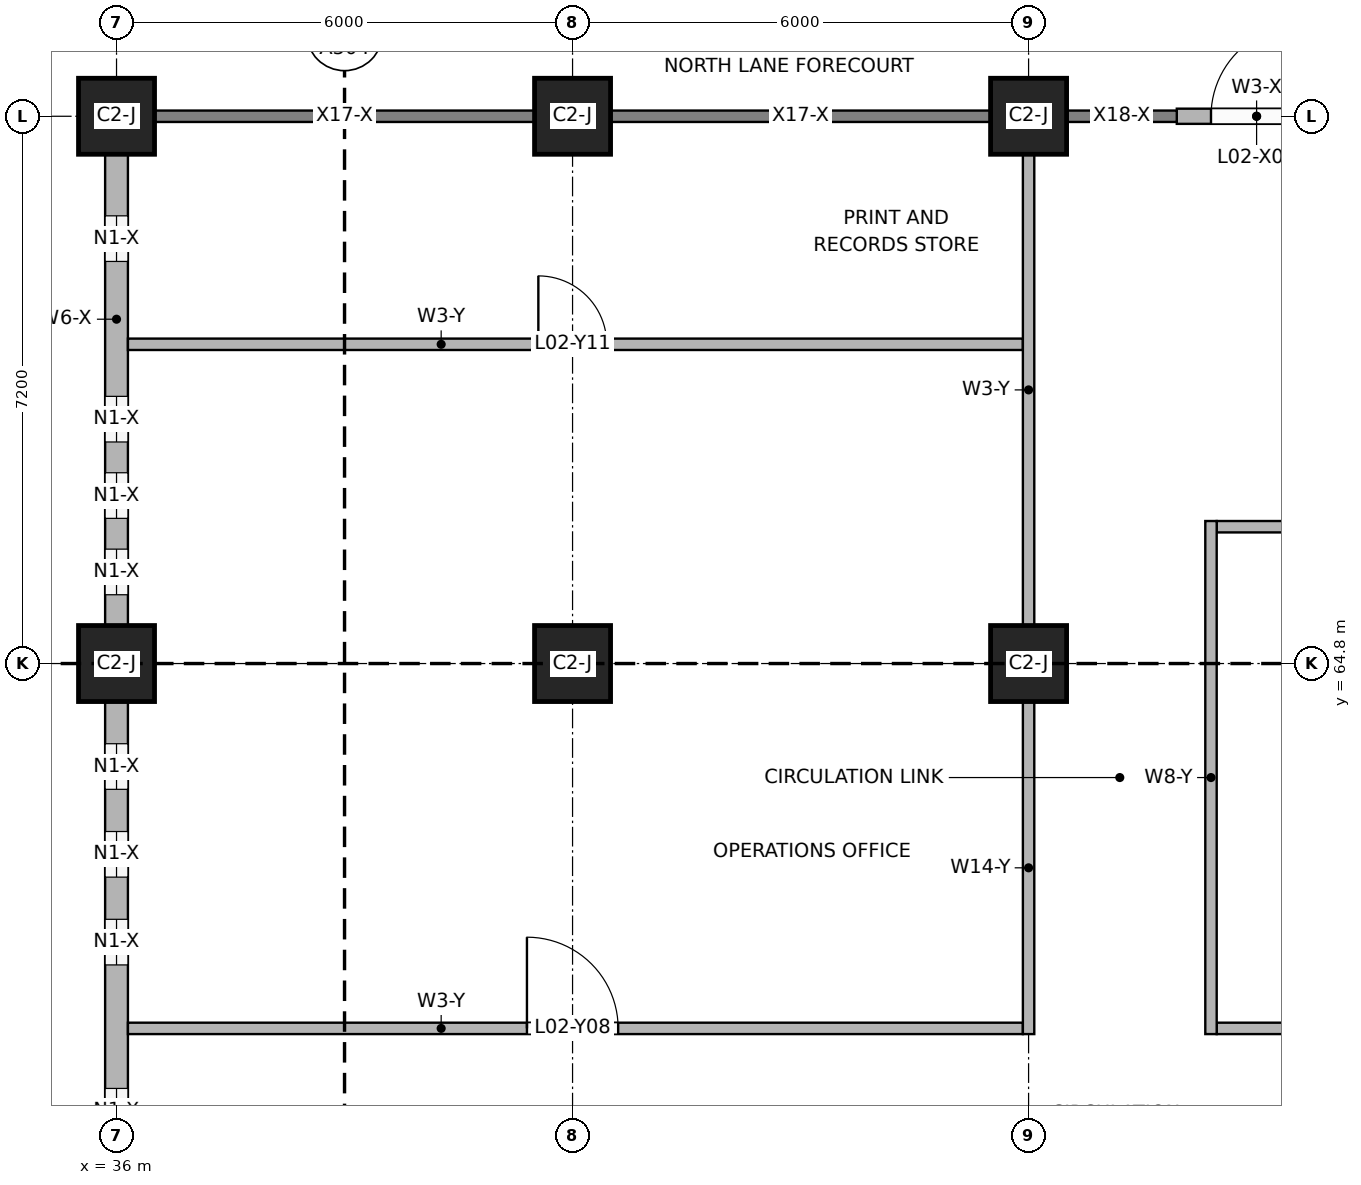
"""IFC4 building model, lengths in metres.
Left out: names, types, materials, properties, quantities, classifications, styles, units other than length and angle.
Written with IfcOpenShell. Run it as: python <this file> out.ifc"""

import sys

from ifc_helpers import new_model, si_unit, direction, frame, frame_2d, origin, origin_2d, place, context, subcontext, project, spatial, rectangle, extrude, element, fill, save


model = new_model("IFC4")
c1 = context("Model", 3, precision=1e-05, world=origin(), true_north=direction((0.0, 1.0)))
c2 = subcontext(c1, "Body", "Model", "MODEL_VIEW")
j1 = project(units=[si_unit("LENGTHUNIT", "METRE"), si_unit("PLANEANGLEUNIT", "RADIAN")], contexts=[c1])
p1 = place(None, origin())
s1 = spatial("IfcSite", under=j1, at=p1, CompositionType="ELEMENT")
p2 = place(p1, origin())
s2 = spatial("IfcBuilding", under=s1, at=p2, CompositionType="ELEMENT")
p3 = place(p2, frame((0.0, 0.0, 8.4)))
s3 = spatial("IfcBuildingStorey", under=s2, at=p3, CompositionType="ELEMENT", Elevation=8.4)
for number, where, z_axis, x_axis in (
    (1, (36.0, 64.8, 0.0), (0.0, 0.0, 1.0), (1.0, 0.0, 0.0)),
    (2, (42.0, 64.8, 0.0), (0.0, 0.0, 1.0), (1.0, 0.0, 0.0)),
    (3, (48.0, 64.8, 0.0), (0.0, 0.0, 1.0), (1.0, 0.0, 0.0)),
    (4, (36.0, 72.0, 0.0), (0.0, 0.0, 1.0), (1.0, 0.0, 0.0)),
    (5, (42.0, 72.0, 0.0), (0.0, 0.0, 1.0), (1.0, 0.0, 0.0)),
    (6, (48.0, 72.0, 0.0), (0.0, 0.0, 1.0), (1.0, 0.0, 0.0)),
):
    element("IfcColumn", number, at=place(p3, frame(where, z_axis=z_axis, x_axis=x_axis)), inside=s3, PredefinedType="COLUMN", context=c2, shape_type="SweptSolid", body=[
        extrude(rectangle(XDim=1.0, YDim=1.0, at=origin_2d()), origin(), (0.0, 0.0, 1.0), 4.0),
    ])
p4 = place(p3, frame((49.95, 72.0, 0.0), z_axis=(0.0, 0.0, 1.0), x_axis=(1.0, 0.0, 0.0)))
e7 = element("IfcWall", 7, at=p4, inside=s3, PredefinedType="SOLIDWALL", context=c2, shape_type="SweptSolid", body=[
    extrude(rectangle(XDim=2.1, YDim=0.2, at=frame_2d((1.05, 0.0))), origin(), (0.0, 0.0, 1.0), 3.2),
])
p5 = place(p4, frame((0.45, 0.0, 0.0)))
e8 = element("IfcOpeningElement", 8, at=p5, cuts=e7, PredefinedType="OPENING", context=c2, shape_type="SweptSolid", body=[
    extrude(rectangle(XDim=1.2, YDim=2.4, at=frame_2d((0.6, 1.2))), frame((0.0, 0.11, 0.0), z_axis=(0.0, -1.0, 0.0), x_axis=(1.0, 0.0, 0.0)), (0.0, 0.0, 1.0), 0.22),
])
p6 = place(p3, frame((36.0, 58.1, 0.0), z_axis=(0.0, 0.0, 1.0), x_axis=(0.0, 1.0, 0.0)))
e9 = element("IfcWall", 9, at=p6, inside=s3, PredefinedType="SOLIDWALL", context=c2, shape_type="SweptSolid", body=[
    extrude(rectangle(XDim=6.2, YDim=0.3, at=frame_2d((3.1, 0.0))), origin(), (0.0, 0.0, 1.0), 3.1),
])
p7 = place(p6, frame((0.51, 0.0, 0.9)))
e10 = element("IfcOpeningElement", 10, at=p7, cuts=e9, PredefinedType="OPENING", context=c2, shape_type="SweptSolid", body=[
    extrude(rectangle(XDim=0.6, YDim=1.9, at=frame_2d((0.3, 0.95))), frame((0.0, 0.16, 0.0), z_axis=(0.0, -1.0, 0.0), x_axis=(1.0, 0.0, 0.0)), (0.0, 0.0, 1.0), 0.32),
])
p8 = place(p6, frame((2.735, 0.0, 0.9)))
e11 = element("IfcOpeningElement", 11, at=p8, cuts=e9, PredefinedType="OPENING", context=c2, shape_type="SweptSolid", body=[
    extrude(rectangle(XDim=0.6, YDim=1.9, at=frame_2d((0.3, 0.95))), frame((0.0, 0.16, 0.0), z_axis=(0.0, -1.0, 0.0), x_axis=(1.0, 0.0, 0.0)), (0.0, 0.0, 1.0), 0.32),
])
p9 = place(p6, frame((3.89, 0.0, 0.9)))
e12 = element("IfcOpeningElement", 12, at=p9, cuts=e9, PredefinedType="OPENING", context=c2, shape_type="SweptSolid", body=[
    extrude(rectangle(XDim=0.6, YDim=1.9, at=frame_2d((0.3, 0.95))), frame((0.0, 0.16, 0.0), z_axis=(0.0, -1.0, 0.0), x_axis=(1.0, 0.0, 0.0)), (0.0, 0.0, 1.0), 0.32),
])
p10 = place(p6, frame((5.045, 0.0, 0.9)))
e13 = element("IfcOpeningElement", 13, at=p10, cuts=e9, PredefinedType="OPENING", context=c2, shape_type="SweptSolid", body=[
    extrude(rectangle(XDim=0.6, YDim=1.9, at=frame_2d((0.3, 0.95))), frame((0.0, 0.16, 0.0), z_axis=(0.0, -1.0, 0.0), x_axis=(1.0, 0.0, 0.0)), (0.0, 0.0, 1.0), 0.32),
])
p11 = place(p3, frame((36.0, 65.3, 0.0), z_axis=(0.0, 0.0, 1.0), x_axis=(0.0, 1.0, 0.0)))
e14 = element("IfcWall", 14, at=p11, inside=s3, PredefinedType="SOLIDWALL", context=c2, shape_type="SweptSolid", body=[
    extrude(rectangle(XDim=6.2, YDim=0.3, at=frame_2d((3.1, 0.0))), origin(), (0.0, 0.0, 1.0), 3.1),
])
p12 = place(p11, frame((0.405, 0.0, 0.9)))
e15 = element("IfcOpeningElement", 15, at=p12, cuts=e14, PredefinedType="OPENING", context=c2, shape_type="SweptSolid", body=[
    extrude(rectangle(XDim=0.6, YDim=1.9, at=frame_2d((0.3, 0.95))), frame((0.0, 0.16, 0.0), z_axis=(0.0, -1.0, 0.0), x_axis=(1.0, 0.0, 0.0)), (0.0, 0.0, 1.0), 0.32),
])
p13 = place(p11, frame((1.41, 0.0, 0.9)))
e16 = element("IfcOpeningElement", 16, at=p13, cuts=e14, PredefinedType="OPENING", context=c2, shape_type="SweptSolid", body=[
    extrude(rectangle(XDim=0.6, YDim=1.9, at=frame_2d((0.3, 0.95))), frame((0.0, 0.16, 0.0), z_axis=(0.0, -1.0, 0.0), x_axis=(1.0, 0.0, 0.0)), (0.0, 0.0, 1.0), 0.32),
])
p14 = place(p11, frame((2.415, 0.0, 0.9)))
e17 = element("IfcOpeningElement", 17, at=p14, cuts=e14, PredefinedType="OPENING", context=c2, shape_type="SweptSolid", body=[
    extrude(rectangle(XDim=0.6, YDim=1.9, at=frame_2d((0.3, 0.95))), frame((0.0, 0.16, 0.0), z_axis=(0.0, -1.0, 0.0), x_axis=(1.0, 0.0, 0.0)), (0.0, 0.0, 1.0), 0.32),
])
p15 = place(p11, frame((4.79, 0.0, 0.9)))
e18 = element("IfcOpeningElement", 18, at=p15, cuts=e14, PredefinedType="OPENING", context=c2, shape_type="SweptSolid", body=[
    extrude(rectangle(XDim=0.6, YDim=1.9, at=frame_2d((0.3, 0.95))), frame((0.0, 0.16, 0.0), z_axis=(0.0, -1.0, 0.0), x_axis=(1.0, 0.0, 0.0)), (0.0, 0.0, 1.0), 0.32),
])
p16 = place(p3, frame((48.0, 59.925, 0.0), z_axis=(0.0, 0.0, 1.0), x_axis=(0.0, 1.0, 0.0)))
e19 = element("IfcWall", 19, at=p16, inside=s3, PredefinedType="PARTITIONING", context=c2, shape_type="SweptSolid", body=[
    extrude(rectangle(XDim=4.375, YDim=0.15, at=frame_2d((2.188, 0.0))), origin(), (0.0, 0.0, 1.0), 4.0),
])
p17 = place(p3, frame((48.0, 65.3, 0.0), z_axis=(0.0, 0.0, 1.0), x_axis=(0.0, 1.0, 0.0)))
e20 = element("IfcWall", 20, at=p17, inside=s3, PredefinedType="PARTITIONING", context=c2, shape_type="SweptSolid", body=[
    extrude(rectangle(XDim=6.2, YDim=0.15, at=frame_2d((3.1, 0.0))), origin(), (0.0, 0.0, 1.0), 3.1),
])
p18 = place(p3, frame((50.4, 59.925, 0.0), z_axis=(0.0, 0.0, 1.0), x_axis=(0.0, 1.0, 0.0)))
e21 = element("IfcWall", 21, at=p18, inside=s3, PredefinedType="PARTITIONING", context=c2, shape_type="SweptSolid", body=[
    extrude(rectangle(XDim=6.75, YDim=0.15, at=frame_2d((3.375, 0.0))), origin(), (0.0, 0.0, 1.0), 3.2),
])
p19 = place(p3, frame((36.15, 60.0, 0.0), z_axis=(0.0, 0.0, 1.0), x_axis=(1.0, 0.0, 0.0)))
e22 = element("IfcWall", 22, at=p19, inside=s3, PredefinedType="PARTITIONING", context=c2, shape_type="SweptSolid", body=[
    extrude(rectangle(XDim=11.775, YDim=0.15, at=frame_2d((5.888, 0.0))), origin(), (0.0, 0.0, 1.0), 3.1),
])
p20 = place(p19, frame((5.25, 0.0, 0.0)))
e23 = element("IfcOpeningElement", 23, at=p20, cuts=e22, PredefinedType="OPENING", context=c2, shape_type="SweptSolid", body=[
    extrude(rectangle(XDim=1.2, YDim=2.1, at=frame_2d((0.6, 1.05))), frame((0.0, 0.085, 0.0), z_axis=(0.0, -1.0, 0.0), x_axis=(1.0, 0.0, 0.0)), (0.0, 0.0, 1.0), 0.17),
])
p21 = place(p3, frame((50.475, 60.0, 0.0), z_axis=(0.0, 0.0, 1.0), x_axis=(1.0, 0.0, 0.0)))
e24 = element("IfcWall", 24, at=p21, inside=s3, PredefinedType="PARTITIONING", context=c2, shape_type="SweptSolid", body=[
    extrude(rectangle(XDim=15.45, YDim=0.15, at=frame_2d((7.725, 0.0))), origin(), (0.0, 0.0, 1.0), 3.1),
])
p22 = place(p21, frame((7.125, 0.0, 0.0)))
e25 = element("IfcOpeningElement", 25, at=p22, cuts=e24, PredefinedType="OPENING", context=c2, shape_type="SweptSolid", body=[
    extrude(rectangle(XDim=1.2, YDim=2.1, at=frame_2d((0.6, 1.05))), frame((0.0, 0.085, 0.0), z_axis=(0.0, -1.0, 0.0), x_axis=(1.0, 0.0, 0.0)), (0.0, 0.0, 1.0), 0.17),
])
p23 = place(p3, frame((50.475, 66.6, 0.0), z_axis=(0.0, 0.0, 1.0), x_axis=(1.0, 0.0, 0.0)))
e26 = element("IfcWall", 26, at=p23, inside=s3, PredefinedType="PARTITIONING", context=c2, shape_type="SweptSolid", body=[
    extrude(rectangle(XDim=15.525, YDim=0.15, at=frame_2d((7.762, 0.0))), origin(), (0.0, 0.0, 1.0), 3.1),
])
p24 = place(p3, frame((36.15, 69.0, 0.0), z_axis=(0.0, 0.0, 1.0), x_axis=(1.0, 0.0, 0.0)))
e27 = element("IfcWall", 27, at=p24, inside=s3, PredefinedType="PARTITIONING", context=c2, shape_type="SweptSolid", body=[
    extrude(rectangle(XDim=11.775, YDim=0.15, at=frame_2d((5.888, 0.0))), origin(), (0.0, 0.0, 1.0), 3.1),
])
p25 = place(p24, frame((5.4, 0.0, 0.0)))
e28 = element("IfcOpeningElement", 28, at=p25, cuts=e27, PredefinedType="OPENING", context=c2, shape_type="SweptSolid", body=[
    extrude(rectangle(XDim=0.9, YDim=2.1, at=frame_2d((0.45, 1.05))), frame((0.0, 0.085, 0.0), z_axis=(0.0, -1.0, 0.0), x_axis=(1.0, 0.0, 0.0)), (0.0, 0.0, 1.0), 0.17),
])
p26 = place(p5, origin())
e29 = element("IfcDoor", 29, at=p26, inside=s3, OperationType="SINGLE_SWING_RIGHT", PredefinedType="DOOR", context=c2, shape_type="SweptSolid", body=[
    extrude(rectangle(XDim=1.2, YDim=2.4, at=frame_2d((0.6, 1.2))), frame((0.0, 0.025, 0.0), z_axis=(0.0, -1.0, 0.0), x_axis=(1.0, 0.0, 0.0)), (0.0, 0.0, 1.0), 0.05),
])
fill(e8, e29)
p27 = place(p7, origin())
e30 = element("IfcWindow", 30, at=p27, inside=s3, PartitioningType="SINGLE_PANEL", PredefinedType="WINDOW", context=c2, shape_type="SweptSolid", body=[
    extrude(rectangle(XDim=0.6, YDim=1.9, at=frame_2d((0.3, 0.95))), frame((0.0, 0.03, 0.0), z_axis=(0.0, -1.0, 0.0), x_axis=(1.0, 0.0, 0.0)), (0.0, 0.0, 1.0), 0.06),
])
fill(e10, e30)
p28 = place(p8, origin())
e31 = element("IfcWindow", 31, at=p28, inside=s3, PartitioningType="SINGLE_PANEL", PredefinedType="WINDOW", context=c2, shape_type="SweptSolid", body=[
    extrude(rectangle(XDim=0.6, YDim=1.9, at=frame_2d((0.3, 0.95))), frame((0.0, 0.03, 0.0), z_axis=(0.0, -1.0, 0.0), x_axis=(1.0, 0.0, 0.0)), (0.0, 0.0, 1.0), 0.06),
])
fill(e11, e31)
p29 = place(p9, origin())
e32 = element("IfcWindow", 32, at=p29, inside=s3, PartitioningType="SINGLE_PANEL", PredefinedType="WINDOW", context=c2, shape_type="SweptSolid", body=[
    extrude(rectangle(XDim=0.6, YDim=1.9, at=frame_2d((0.3, 0.95))), frame((0.0, 0.03, 0.0), z_axis=(0.0, -1.0, 0.0), x_axis=(1.0, 0.0, 0.0)), (0.0, 0.0, 1.0), 0.06),
])
fill(e12, e32)
p30 = place(p10, origin())
e33 = element("IfcWindow", 33, at=p30, inside=s3, PartitioningType="SINGLE_PANEL", PredefinedType="WINDOW", context=c2, shape_type="SweptSolid", body=[
    extrude(rectangle(XDim=0.6, YDim=1.9, at=frame_2d((0.3, 0.95))), frame((0.0, 0.03, 0.0), z_axis=(0.0, -1.0, 0.0), x_axis=(1.0, 0.0, 0.0)), (0.0, 0.0, 1.0), 0.06),
])
fill(e13, e33)
p31 = place(p12, origin())
e34 = element("IfcWindow", 34, at=p31, inside=s3, PartitioningType="SINGLE_PANEL", PredefinedType="WINDOW", context=c2, shape_type="SweptSolid", body=[
    extrude(rectangle(XDim=0.6, YDim=1.9, at=frame_2d((0.3, 0.95))), frame((0.0, 0.03, 0.0), z_axis=(0.0, -1.0, 0.0), x_axis=(1.0, 0.0, 0.0)), (0.0, 0.0, 1.0), 0.06),
])
fill(e15, e34)
p32 = place(p13, origin())
e35 = element("IfcWindow", 35, at=p32, inside=s3, PartitioningType="SINGLE_PANEL", PredefinedType="WINDOW", context=c2, shape_type="SweptSolid", body=[
    extrude(rectangle(XDim=0.6, YDim=1.9, at=frame_2d((0.3, 0.95))), frame((0.0, 0.03, 0.0), z_axis=(0.0, -1.0, 0.0), x_axis=(1.0, 0.0, 0.0)), (0.0, 0.0, 1.0), 0.06),
])
fill(e16, e35)
p33 = place(p14, origin())
e36 = element("IfcWindow", 36, at=p33, inside=s3, PartitioningType="SINGLE_PANEL", PredefinedType="WINDOW", context=c2, shape_type="SweptSolid", body=[
    extrude(rectangle(XDim=0.6, YDim=1.9, at=frame_2d((0.3, 0.95))), frame((0.0, 0.03, 0.0), z_axis=(0.0, -1.0, 0.0), x_axis=(1.0, 0.0, 0.0)), (0.0, 0.0, 1.0), 0.06),
])
fill(e17, e36)
p34 = place(p15, origin())
e37 = element("IfcWindow", 37, at=p34, inside=s3, PartitioningType="SINGLE_PANEL", PredefinedType="WINDOW", context=c2, shape_type="SweptSolid", body=[
    extrude(rectangle(XDim=0.6, YDim=1.9, at=frame_2d((0.3, 0.95))), frame((0.0, 0.03, 0.0), z_axis=(0.0, -1.0, 0.0), x_axis=(1.0, 0.0, 0.0)), (0.0, 0.0, 1.0), 0.06),
])
fill(e18, e37)
p35 = place(p20, origin())
e38 = element("IfcDoor", 38, at=p35, inside=s3, OperationType="SINGLE_SWING_LEFT", PredefinedType="DOOR", context=c2, shape_type="SweptSolid", body=[
    extrude(rectangle(XDim=1.2, YDim=2.1, at=frame_2d((0.6, 1.05))), frame((0.0, 0.025, 0.0), z_axis=(0.0, -1.0, 0.0), x_axis=(1.0, 0.0, 0.0)), (0.0, 0.0, 1.0), 0.05),
])
fill(e23, e38)
p36 = place(p25, origin())
e39 = element("IfcDoor", 39, at=p36, inside=s3, OperationType="SINGLE_SWING_LEFT", PredefinedType="DOOR", context=c2, shape_type="SweptSolid", body=[
    extrude(rectangle(XDim=0.9, YDim=2.1, at=frame_2d((0.45, 1.05))), frame((0.0, 0.025, 0.0), z_axis=(0.0, -1.0, 0.0), x_axis=(1.0, 0.0, 0.0)), (0.0, 0.0, 1.0), 0.05),
])
fill(e28, e39)
save(model, sys.argv[1])
